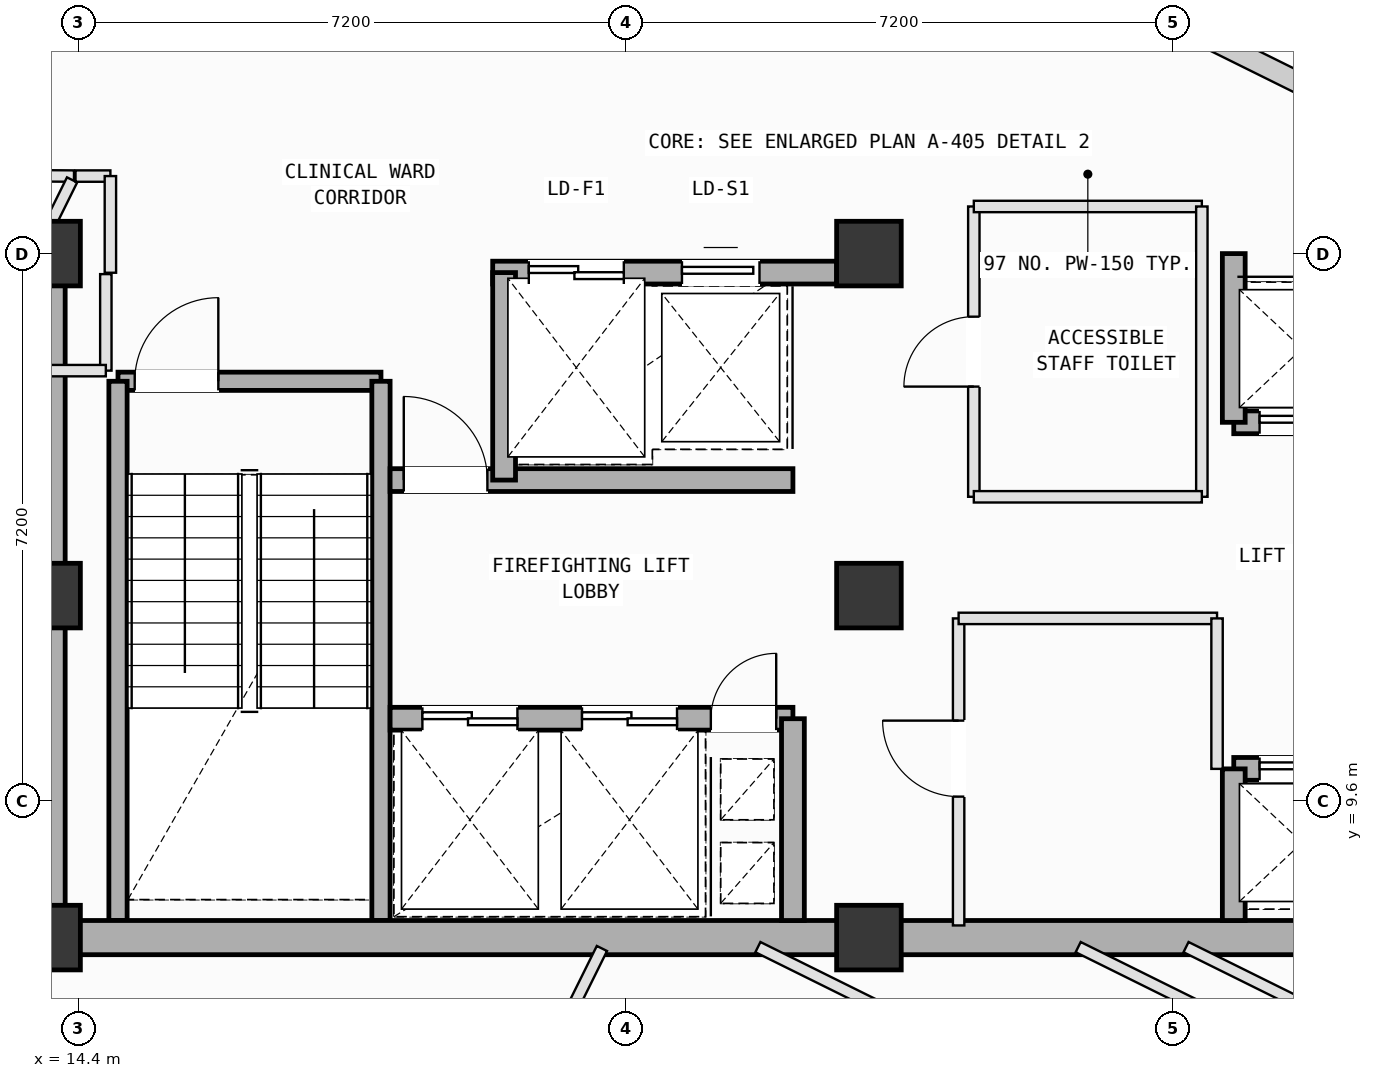
"""IFC4 building model, lengths in metres.
Left out: names, types, materials, properties, quantities, classifications, styles, units other than length and angle.
Written with IfcOpenShell. Run it as: python <this file> out.ifc"""

import sys

from ifc_helpers import new_model, si_unit, direction, frame, frame_2d, origin, origin_2d, place, context, subcontext, project, spatial, rectangle, extrude, element, fill, save


model = new_model("IFC4")
c1 = context("Model", 3, precision=1e-05, world=origin(), true_north=direction((0.0, 1.0)))
c2 = subcontext(c1, "Body", "Model", "MODEL_VIEW")
j1 = project(units=[si_unit("LENGTHUNIT", "METRE"), si_unit("PLANEANGLEUNIT", "RADIAN")], contexts=[c1])
p1 = place(None, origin())
s1 = spatial("IfcSite", under=j1, at=p1, CompositionType="ELEMENT")
p2 = place(p1, origin())
s2 = spatial("IfcBuilding", under=s1, at=p2, CompositionType="ELEMENT")
p3 = place(p2, frame((0.0, 0.0, 296.6)))
s3 = spatial("IfcBuildingStorey", under=s2, at=p3, CompositionType="ELEMENT", Elevation=296.6)
for number, where, z_axis, x_axis in (
    (1, (14.0, 7.8, 0.0), (0.0, 0.0, 1.0), (1.0, 0.0, 0.0)),
    (2, (14.0, 12.3, 0.0), (0.0, 0.0, 1.0), (1.0, 0.0, 0.0)),
    (3, (14.0, 16.8, 0.0), (0.0, 0.0, 1.0), (1.0, 0.0, 0.0)),
    (4, (24.8, 7.8, 0.0), (0.0, 0.0, 1.0), (1.0, 0.0, 0.0)),
    (5, (24.8, 12.3, 0.0), (0.0, 0.0, 1.0), (1.0, 0.0, 0.0)),
    (6, (24.8, 16.8, 0.0), (0.0, 0.0, 1.0), (1.0, 0.0, 0.0)),
):
    element("IfcColumn", number, at=place(p3, frame(where, z_axis=z_axis, x_axis=x_axis)), inside=s3, PredefinedType="COLUMN", context=c2, shape_type="SweptSolid", body=[
        extrude(rectangle(XDim=0.85, YDim=0.85, at=origin_2d()), origin(), (0.0, 0.0, 1.0), 4.0),
    ])
p4 = place(p3, frame((25.36, 21.572, 0.0), z_axis=(0.0, 0.0, 1.0), x_axis=(0.896098080612, -0.443856091458, 0.0)))
e7 = element("IfcWall", 7, at=p4, inside=s3, PredefinedType="SOLIDWALL", context=c2, shape_type="SweptSolid", body=[
    extrude(rectangle(XDim=6.958, YDim=0.28, at=frame_2d((3.479, 0.0))), origin(), (0.0, 0.0, 1.0), 3.165),
])
p5 = place(p3, frame((14.92, 15.12, 0.0), z_axis=(0.0, 0.0, 1.0), x_axis=(1.0, 0.0, 0.0)))
e8 = element("IfcWall", 8, at=p5, inside=s3, PredefinedType="SOLIDWALL", context=c2, shape_type="SweptSolid", body=[
    extrude(rectangle(XDim=3.46, YDim=0.24, at=frame_2d((1.73, 0.0))), origin(), (0.0, 0.0, 1.0), 3.78),
])
p6 = place(p5, frame((0.22, 0.0, 0.0)))
e9 = element("IfcOpeningElement", 9, at=p6, cuts=e8, PredefinedType="OPENING", context=c2, shape_type="SweptSolid", body=[
    extrude(rectangle(XDim=1.1, YDim=2.15, at=frame_2d((0.55, 1.075))), frame((0.0, 0.13, 0.0), z_axis=(0.0, -1.0, 0.0), x_axis=(1.0, 0.0, 0.0)), (0.0, 0.0, 1.0), 0.26),
])
for number, where, z_axis, x_axis in (
    (10, (18.38, 15.12, 0.0), (0.0, 0.0, 1.0), (0.0, -1.0, 0.0)),
    (11, (14.92, 8.025, 0.0), (0.0, 0.0, 1.0), (0.0, 1.0, 0.0)),
):
    element("IfcWall", number, at=place(p3, frame(where, z_axis=z_axis, x_axis=x_axis)), inside=s3, PredefinedType="SOLIDWALL", context=c2, shape_type="SweptSolid", body=[
        extrude(rectangle(XDim=7.095, YDim=0.24, at=frame_2d((3.548, 0.0))), origin(), (0.0, 0.0, 1.0), 3.78),
    ])
for number, where, z_axis, x_axis in (
    (12, (14.0, 7.8, 0.0), (0.0, 0.0, 1.0), (1.0, 0.0, 0.0)),
    (13, (24.8, 7.8, 0.0), (0.0, 0.0, 1.0), (1.0, 0.0, 0.0)),
):
    element("IfcWall", number, at=place(p3, frame(where, z_axis=z_axis, x_axis=x_axis)), inside=s3, PredefinedType="SHEAR", context=c2, shape_type="SweptSolid", body=[
        extrude(rectangle(XDim=10.8, YDim=0.45, at=frame_2d((5.4, 0.0))), origin(), (0.0, 0.0, 1.0), 3.78),
    ])
p7 = place(p3, frame((14.0, 16.8, 0.0), z_axis=(0.0, 0.0, 1.0), x_axis=(0.0, -1.0, 0.0)))
e14 = element("IfcWall", 14, at=p7, inside=s3, PredefinedType="SHEAR", context=c2, shape_type="SweptSolid", body=[
    extrude(rectangle(XDim=9.0, YDim=0.45, at=frame_2d((4.5, 0.0))), origin(), (0.0, 0.0, 1.0), 3.78),
])
p8 = place(p3, frame((19.85, 16.55, 0.0), z_axis=(0.0, 0.0, 1.0), x_axis=(1.0, 0.0, 0.0)))
e15 = element("IfcWall", 15, at=p8, inside=s3, PredefinedType="SOLIDWALL", context=c2, shape_type="SweptSolid", body=[
    extrude(rectangle(XDim=4.525, YDim=0.3, at=frame_2d((2.262, 0.0))), origin(), (0.0, 0.0, 1.0), 3.78),
])
p9 = place(p8, frame((0.475, 0.0, 0.0)))
e16 = element("IfcOpeningElement", 16, at=p9, cuts=e15, PredefinedType="OPENING", context=c2, shape_type="SweptSolid", body=[
    extrude(rectangle(XDim=1.25, YDim=2.18, at=frame_2d((0.625, 1.09))), frame((0.0, 0.16, 0.0), z_axis=(0.0, -1.0, 0.0), x_axis=(1.0, 0.0, 0.0)), (0.0, 0.0, 1.0), 0.32),
])
p10 = place(p8, frame((2.49, 0.0, 0.0)))
e17 = element("IfcOpeningElement", 17, at=p10, cuts=e15, PredefinedType="OPENING", context=c2, shape_type="SweptSolid", body=[
    extrude(rectangle(XDim=1.02, YDim=2.12, at=frame_2d((0.51, 1.06))), frame((0.0, 0.16, 0.0), z_axis=(0.0, -1.0, 0.0), x_axis=(1.0, 0.0, 0.0)), (0.0, 0.0, 1.0), 0.32),
])
p11 = place(p3, frame((18.5, 10.68, 0.0), z_axis=(0.0, 0.0, 1.0), x_axis=(1.0, 0.0, 0.0)))
e18 = element("IfcWall", 18, at=p11, inside=s3, PredefinedType="SOLIDWALL", context=c2, shape_type="SweptSolid", body=[
    extrude(rectangle(XDim=5.3, YDim=0.3, at=frame_2d((2.65, 0.0))), origin(), (0.0, 0.0, 1.0), 3.78),
])
p12 = place(p11, frame((4.22, 0.0, 0.0)))
e19 = element("IfcOpeningElement", 19, at=p12, cuts=e18, PredefinedType="OPENING", context=c2, shape_type="SweptSolid", body=[
    extrude(rectangle(XDim=0.86, YDim=2.06, at=frame_2d((0.43, 1.03))), frame((0.0, 0.16, 0.0), z_axis=(0.0, -1.0, 0.0), x_axis=(1.0, 0.0, 0.0)), (0.0, 0.0, 1.0), 0.32),
])
p13 = place(p11, frame((0.425, 0.0, 0.0)))
e20 = element("IfcOpeningElement", 20, at=p13, cuts=e18, PredefinedType="OPENING", context=c2, shape_type="SweptSolid", body=[
    extrude(rectangle(XDim=1.25, YDim=2.18, at=frame_2d((0.625, 1.09))), frame((0.0, 0.16, 0.0), z_axis=(0.0, -1.0, 0.0), x_axis=(1.0, 0.0, 0.0)), (0.0, 0.0, 1.0), 0.32),
])
p14 = place(p11, frame((2.525, 0.0, 0.0)))
e21 = element("IfcOpeningElement", 21, at=p14, cuts=e18, PredefinedType="OPENING", context=c2, shape_type="SweptSolid", body=[
    extrude(rectangle(XDim=1.25, YDim=2.18, at=frame_2d((0.625, 1.09))), frame((0.0, 0.16, 0.0), z_axis=(0.0, -1.0, 0.0), x_axis=(1.0, 0.0, 0.0)), (0.0, 0.0, 1.0), 0.32),
])
p15 = place(p3, frame((18.5, 13.82, 0.0), z_axis=(0.0, 0.0, 1.0), x_axis=(1.0, 0.0, 0.0)))
e22 = element("IfcWall", 22, at=p15, inside=s3, PredefinedType="SOLIDWALL", context=c2, shape_type="SweptSolid", body=[
    extrude(rectangle(XDim=5.3, YDim=0.3, at=frame_2d((2.65, 0.0))), origin(), (0.0, 0.0, 1.0), 3.78),
])
p16 = place(p15, frame((0.18, 0.0, 0.0)))
e23 = element("IfcOpeningElement", 23, at=p16, cuts=e22, PredefinedType="OPENING", context=c2, shape_type="SweptSolid", body=[
    extrude(rectangle(XDim=1.1, YDim=2.15, at=frame_2d((0.55, 1.075))), frame((0.0, 0.16, 0.0), z_axis=(0.0, -1.0, 0.0), x_axis=(1.0, 0.0, 0.0)), (0.0, 0.0, 1.0), 0.32),
])
p17 = place(p3, frame((23.8, 8.025, 0.0), z_axis=(0.0, 0.0, 1.0), x_axis=(0.0, 1.0, 0.0)))
e24 = element("IfcWall", 24, at=p17, inside=s3, PredefinedType="SOLIDWALL", context=c2, shape_type="SweptSolid", body=[
    extrude(rectangle(XDim=2.655, YDim=0.3, at=frame_2d((1.328, 0.0))), origin(), (0.0, 0.0, 1.0), 3.78),
])
p18 = place(p3, frame((20.0, 13.82, 0.0), z_axis=(0.0, 0.0, 1.0), x_axis=(0.0, 1.0, 0.0)))
e25 = element("IfcWall", 25, at=p18, inside=s3, PredefinedType="SOLIDWALL", context=c2, shape_type="SweptSolid", body=[
    extrude(rectangle(XDim=2.73, YDim=0.3, at=frame_2d((1.365, 0.0))), origin(), (0.0, 0.0, 1.0), 3.78),
])
p19 = place(p3, frame((29.6, 10.02, 0.0), z_axis=(0.0, 0.0, 1.0), x_axis=(1.0, 0.0, 0.0)))
e26 = element("IfcWall", 26, at=p19, inside=s3, PredefinedType="SOLIDWALL", context=c2, shape_type="SweptSolid", body=[
    extrude(rectangle(XDim=1.7, YDim=0.3, at=frame_2d((0.85, 0.0))), origin(), (0.0, 0.0, 1.0), 3.78),
])
p20 = place(p19, frame((0.34, 0.0, 0.0)))
e27 = element("IfcOpeningElement", 27, at=p20, cuts=e26, PredefinedType="OPENING", context=c2, shape_type="SweptSolid", body=[
    extrude(rectangle(XDim=1.12, YDim=2.15, at=frame_2d((0.56, 1.075))), frame((0.0, 0.16, 0.0), z_axis=(0.0, -1.0, 0.0), x_axis=(1.0, 0.0, 0.0)), (0.0, 0.0, 1.0), 0.32),
])
p21 = place(p3, frame((29.6, 8.025, 0.0), z_axis=(0.0, 0.0, 1.0), x_axis=(0.0, 1.0, 0.0)))
e28 = element("IfcWall", 28, at=p21, inside=s3, PredefinedType="SOLIDWALL", context=c2, shape_type="SweptSolid", body=[
    extrude(rectangle(XDim=1.995, YDim=0.3, at=frame_2d((0.998, 0.0))), origin(), (0.0, 0.0, 1.0), 3.78),
])
p22 = place(p3, frame((29.6, 14.58, 0.0), z_axis=(0.0, 0.0, 1.0), x_axis=(1.0, 0.0, 0.0)))
e29 = element("IfcWall", 29, at=p22, inside=s3, PredefinedType="SOLIDWALL", context=c2, shape_type="SweptSolid", body=[
    extrude(rectangle(XDim=1.7, YDim=0.3, at=frame_2d((0.85, 0.0))), origin(), (0.0, 0.0, 1.0), 3.78),
])
p23 = place(p22, frame((0.34, 0.0, 0.0)))
e30 = element("IfcOpeningElement", 30, at=p23, cuts=e29, PredefinedType="OPENING", context=c2, shape_type="SweptSolid", body=[
    extrude(rectangle(XDim=1.12, YDim=2.15, at=frame_2d((0.56, 1.075))), frame((0.0, 0.16, 0.0), z_axis=(0.0, -1.0, 0.0), x_axis=(1.0, 0.0, 0.0)), (0.0, 0.0, 1.0), 0.32),
])
p24 = place(p3, frame((29.6, 14.58, 0.0), z_axis=(0.0, 0.0, 1.0), x_axis=(0.0, 1.0, 0.0)))
e31 = element("IfcWall", 31, at=p24, inside=s3, PredefinedType="SOLIDWALL", context=c2, shape_type="SweptSolid", body=[
    extrude(rectangle(XDim=2.22, YDim=0.3, at=frame_2d((1.11, 0.0))), origin(), (0.0, 0.0, 1.0), 3.78),
])
p25 = place(p3, frame((25.98, 7.96, 0.0), z_axis=(0.0, 0.0, 1.0), x_axis=(0.0, 1.0, 0.0)))
e32 = element("IfcWall", 32, at=p25, inside=s3, PredefinedType="PARTITIONING", context=c2, shape_type="SweptSolid", body=[
    extrude(rectangle(XDim=4.04, YDim=0.15, at=frame_2d((2.02, 0.0))), origin(), (0.0, 0.0, 1.0), 3.78),
])
p26 = place(p25, frame((1.695, 0.0, 0.0)))
e33 = element("IfcOpeningElement", 33, at=p26, cuts=e32, PredefinedType="OPENING", context=c2, shape_type="SweptSolid", body=[
    extrude(rectangle(XDim=1.0, YDim=2.12, at=frame_2d((0.5, 1.06))), frame((0.0, 0.085, 0.0), z_axis=(0.0, -1.0, 0.0), x_axis=(1.0, 0.0, 0.0)), (0.0, 0.0, 1.0), 0.17),
])
p27 = place(p3, frame((25.98, 12.0, 0.0), z_axis=(0.0, 0.0, 1.0), x_axis=(1.0, 0.0, 0.0)))
e34 = element("IfcWall", 34, at=p27, inside=s3, PredefinedType="PARTITIONING", context=c2, shape_type="SweptSolid", body=[
    extrude(rectangle(XDim=3.4, YDim=0.15, at=frame_2d((1.7, 0.0))), origin(), (0.0, 0.0, 1.0), 3.78),
])
p28 = place(p3, frame((29.38, 12.0, 0.0), z_axis=(0.0, 0.0, 1.0), x_axis=(0.0, -1.0, 0.0)))
e35 = element("IfcWall", 35, at=p28, inside=s3, PredefinedType="PARTITIONING", context=c2, shape_type="SweptSolid", body=[
    extrude(rectangle(XDim=1.98, YDim=0.15, at=frame_2d((0.99, 0.0))), origin(), (0.0, 0.0, 1.0), 3.78),
])
p29 = place(p3, frame((26.18, 13.6, 0.0), z_axis=(0.0, 0.0, 1.0), x_axis=(0.0, 1.0, 0.0)))
e36 = element("IfcWall", 36, at=p29, inside=s3, PredefinedType="PARTITIONING", context=c2, shape_type="SweptSolid", body=[
    extrude(rectangle(XDim=3.82, YDim=0.15, at=frame_2d((1.91, 0.0))), origin(), (0.0, 0.0, 1.0), 3.78),
])
p30 = place(p29, frame((1.45, 0.0, 0.0)))
e37 = element("IfcOpeningElement", 37, at=p30, cuts=e36, PredefinedType="OPENING", context=c2, shape_type="SweptSolid", body=[
    extrude(rectangle(XDim=0.92, YDim=2.1, at=frame_2d((0.46, 1.05))), frame((0.0, 0.085, 0.0), z_axis=(0.0, -1.0, 0.0), x_axis=(1.0, 0.0, 0.0)), (0.0, 0.0, 1.0), 0.17),
])
p31 = place(p3, frame((26.18, 17.42, 0.0), z_axis=(0.0, 0.0, 1.0), x_axis=(1.0, 0.0, 0.0)))
e38 = element("IfcWall", 38, at=p31, inside=s3, PredefinedType="PARTITIONING", context=c2, shape_type="SweptSolid", body=[
    extrude(rectangle(XDim=3.0, YDim=0.15, at=frame_2d((1.5, 0.0))), origin(), (0.0, 0.0, 1.0), 3.78),
])
p32 = place(p3, frame((29.18, 17.42, 0.0), z_axis=(0.0, 0.0, 1.0), x_axis=(0.0, -1.0, 0.0)))
e39 = element("IfcWall", 39, at=p32, inside=s3, PredefinedType="PARTITIONING", context=c2, shape_type="SweptSolid", body=[
    extrude(rectangle(XDim=3.82, YDim=0.15, at=frame_2d((1.91, 0.0))), origin(), (0.0, 0.0, 1.0), 3.78),
])
p33 = place(p3, frame((29.18, 13.6, 0.0), z_axis=(0.0, 0.0, 1.0), x_axis=(-1.0, 0.0, 0.0)))
e40 = element("IfcWall", 40, at=p33, inside=s3, PredefinedType="PARTITIONING", context=c2, shape_type="SweptSolid", body=[
    extrude(rectangle(XDim=3.0, YDim=0.15, at=frame_2d((1.5, 0.0))), origin(), (0.0, 0.0, 1.0), 3.78),
])
p34 = place(p3, frame((18.398, 1.825, 0.0), z_axis=(0.0, 0.0, 1.0), x_axis=(0.443909549261, 0.89607159986, 0.0)))
e41 = element("IfcWall", 41, at=p34, inside=s3, PredefinedType="PARTITIONING", context=c2, shape_type="SweptSolid", body=[
    extrude(rectangle(XDim=6.509, YDim=0.15, at=frame_2d((3.254, 0.0))), origin(), (0.0, 0.0, 1.0), 3.78),
])
p35 = place(p34, frame((2.737, 0.0, 0.0)))
e42 = element("IfcOpeningElement", 42, at=p35, cuts=e41, PredefinedType="OPENING", context=c2, shape_type="SweptSolid", body=[
    extrude(rectangle(XDim=0.86, YDim=2.06, at=frame_2d((0.43, 1.03))), frame((0.0, 0.085, 0.0), z_axis=(0.0, -1.0, 0.0), x_axis=(1.0, 0.0, 0.0)), (0.0, 0.0, 1.0), 0.17),
])
p36 = place(p3, frame((23.339, 7.675, 0.0), z_axis=(0.0, 0.0, 1.0), x_axis=(0.896093187534, -0.443865969923, 0.0)))
e43 = element("IfcWall", 43, at=p36, inside=s3, PredefinedType="PARTITIONING", context=c2, shape_type="SweptSolid", body=[
    extrude(rectangle(XDim=4.409, YDim=0.15, at=frame_2d((2.205, 0.0))), origin(), (0.0, 0.0, 1.0), 3.78),
])
p37 = place(p3, frame((35.107, 4.636, 0.0), z_axis=(0.0, 0.0, 1.0), x_axis=(-0.8960827402, 0.443887060767, 0.0)))
e44 = element("IfcWall", 44, at=p37, inside=s3, PredefinedType="PARTITIONING", context=c2, shape_type="SweptSolid", body=[
    extrude(rectangle(XDim=6.846, YDim=0.15, at=frame_2d((3.423, 0.0))), origin(), (0.0, 0.0, 1.0), 3.78),
])
p38 = place(p3, frame((12.525, 17.833, 0.0), z_axis=(0.0, 0.0, 1.0), x_axis=(0.999974620907, -0.007124432707, 0.0)))
e45 = element("IfcWall", 45, at=p38, inside=s3, PredefinedType="PARTITIONING", context=c2, shape_type="SweptSolid", body=[
    extrude(rectangle(XDim=1.816, YDim=0.15, at=frame_2d((0.908, 0.0))), origin(), (0.0, 0.0, 1.0), 3.78),
])
p39 = place(p3, frame((14.316, 17.77, 0.0), z_axis=(0.0, 0.0, 1.0), x_axis=(-0.443525386391, -0.896261809756, 0.0)))
e46 = element("IfcWall", 46, at=p39, inside=s3, PredefinedType="PARTITIONING", context=c2, shape_type="SweptSolid", body=[
    extrude(rectangle(XDim=0.875, YDim=0.15, at=frame_2d((0.438, 0.0))), origin(), (0.0, 0.0, 1.0), 3.78),
])
p40 = place(p3, frame((27.553, 7.675, 0.0), z_axis=(0.0, 0.0, 1.0), x_axis=(0.896074338839, -0.443904020341, 0.0)))
e47 = element("IfcWall", 47, at=p40, inside=s3, PredefinedType="PARTITIONING", context=c2, shape_type="SweptSolid", body=[
    extrude(rectangle(XDim=6.409, YDim=0.15, at=frame_2d((3.205, 0.0))), origin(), (0.0, 0.0, 1.0), 3.78),
])
p41 = place(p3, frame((14.76, 16.53, 0.0), z_axis=(0.0, 0.0, 1.0), x_axis=(0.0, -1.0, 0.0)))
e48 = element("IfcWall", 48, at=p41, inside=s3, PredefinedType="PARTITIONING", context=c2, shape_type="SweptSolid", body=[
    extrude(rectangle(XDim=1.27, YDim=0.15, at=frame_2d((0.635, 0.0))), origin(), (0.0, 0.0, 1.0), 3.78),
])
p42 = place(p3, frame((14.76, 15.26, 0.0), z_axis=(0.0, 0.0, 1.0), x_axis=(-1.0, 0.0, 0.0)))
e49 = element("IfcWall", 49, at=p42, inside=s3, PredefinedType="PARTITIONING", context=c2, shape_type="SweptSolid", body=[
    extrude(rectangle(XDim=1.06, YDim=0.15, at=frame_2d((0.53, 0.0))), origin(), (0.0, 0.0, 1.0), 3.78),
])
p43 = place(p3, frame((14.361, 17.82, 0.0), z_axis=(0.0, 0.0, 1.0), x_axis=(1.0, 0.0, 0.0)))
e50 = element("IfcWall", 50, at=p43, inside=s3, PredefinedType="PARTITIONING", context=c2, shape_type="SweptSolid", body=[
    extrude(rectangle(XDim=0.459, YDim=0.15, at=frame_2d((0.229, 0.0))), origin(), (0.0, 0.0, 1.0), 3.78),
])
p44 = place(p3, frame((14.82, 17.82, 0.0), z_axis=(0.0, 0.0, 1.0), x_axis=(0.0, -1.0, 0.0)))
e51 = element("IfcWall", 51, at=p44, inside=s3, PredefinedType="PARTITIONING", context=c2, shape_type="SweptSolid", body=[
    extrude(rectangle(XDim=1.272, YDim=0.15, at=frame_2d((0.636, 0.0))), origin(), (0.0, 0.0, 1.0), 3.78),
])
p45 = place(p6, origin())
e52 = element("IfcDoor", 52, at=p45, inside=s3, OperationType="SINGLE_SWING_RIGHT", PredefinedType="DOOR", context=c2, shape_type="SweptSolid", body=[
    extrude(rectangle(XDim=1.1, YDim=2.15, at=frame_2d((0.55, 1.075))), frame((0.0, 0.025, 0.0), z_axis=(0.0, -1.0, 0.0), x_axis=(1.0, 0.0, 0.0)), (0.0, 0.0, 1.0), 0.05),
])
fill(e9, e52)
p46 = place(p12, origin())
e53 = element("IfcDoor", 53, at=p46, inside=s3, OperationType="SINGLE_SWING_RIGHT", PredefinedType="DOOR", context=c2, shape_type="SweptSolid", body=[
    extrude(rectangle(XDim=0.86, YDim=2.06, at=frame_2d((0.43, 1.03))), frame((0.0, 0.025, 0.0), z_axis=(0.0, -1.0, 0.0), x_axis=(1.0, 0.0, 0.0)), (0.0, 0.0, 1.0), 0.05),
])
fill(e19, e53)
p47 = place(p16, origin())
e54 = element("IfcDoor", 54, at=p47, inside=s3, OperationType="SINGLE_SWING_LEFT", PredefinedType="DOOR", context=c2, shape_type="SweptSolid", body=[
    extrude(rectangle(XDim=1.1, YDim=2.15, at=frame_2d((0.55, 1.075))), frame((0.0, 0.025, 0.0), z_axis=(0.0, -1.0, 0.0), x_axis=(1.0, 0.0, 0.0)), (0.0, 0.0, 1.0), 0.05),
])
fill(e23, e54)
p48 = place(p13, origin())
e55 = element("IfcDoor", 55, at=p48, inside=s3, OperationType="DOUBLE_DOOR_SLIDING", PredefinedType="DOOR", context=c2, shape_type="SweptSolid", body=[
    extrude(rectangle(XDim=1.25, YDim=2.18, at=frame_2d((0.625, 1.09))), frame((0.0, 0.025, 0.0), z_axis=(0.0, -1.0, 0.0), x_axis=(1.0, 0.0, 0.0)), (0.0, 0.0, 1.0), 0.05),
])
fill(e20, e55)
p49 = place(p14, origin())
e56 = element("IfcDoor", 56, at=p49, inside=s3, OperationType="DOUBLE_DOOR_SLIDING", PredefinedType="DOOR", context=c2, shape_type="SweptSolid", body=[
    extrude(rectangle(XDim=1.25, YDim=2.18, at=frame_2d((0.625, 1.09))), frame((0.0, 0.025, 0.0), z_axis=(0.0, -1.0, 0.0), x_axis=(1.0, 0.0, 0.0)), (0.0, 0.0, 1.0), 0.05),
])
fill(e21, e56)
p50 = place(p20, origin())
e57 = element("IfcDoor", 57, at=p50, inside=s3, OperationType="DOUBLE_DOOR_SLIDING", PredefinedType="DOOR", context=c2, shape_type="SweptSolid", body=[
    extrude(rectangle(XDim=1.12, YDim=2.15, at=frame_2d((0.56, 1.075))), frame((0.0, 0.025, 0.0), z_axis=(0.0, -1.0, 0.0), x_axis=(1.0, 0.0, 0.0)), (0.0, 0.0, 1.0), 0.05),
])
fill(e27, e57)
p51 = place(p23, origin())
e58 = element("IfcDoor", 58, at=p51, inside=s3, OperationType="DOUBLE_DOOR_SLIDING", PredefinedType="DOOR", context=c2, shape_type="SweptSolid", body=[
    extrude(rectangle(XDim=1.12, YDim=2.15, at=frame_2d((0.56, 1.075))), frame((0.0, 0.025, 0.0), z_axis=(0.0, -1.0, 0.0), x_axis=(1.0, 0.0, 0.0)), (0.0, 0.0, 1.0), 0.05),
])
fill(e30, e58)
p52 = place(p9, origin())
e59 = element("IfcDoor", 59, at=p52, inside=s3, OperationType="DOUBLE_DOOR_SLIDING", PredefinedType="DOOR", context=c2, shape_type="SweptSolid", body=[
    extrude(rectangle(XDim=1.25, YDim=2.18, at=frame_2d((0.625, 1.09))), frame((0.0, 0.025, 0.0), z_axis=(0.0, -1.0, 0.0), x_axis=(1.0, 0.0, 0.0)), (0.0, 0.0, 1.0), 0.05),
])
fill(e16, e59)
p53 = place(p10, origin())
e60 = element("IfcDoor", 60, at=p53, inside=s3, OperationType="SLIDING_TO_LEFT", PredefinedType="DOOR", context=c2, shape_type="SweptSolid", body=[
    extrude(rectangle(XDim=1.02, YDim=2.12, at=frame_2d((0.51, 1.06))), frame((0.0, 0.025, 0.0), z_axis=(0.0, -1.0, 0.0), x_axis=(1.0, 0.0, 0.0)), (0.0, 0.0, 1.0), 0.05),
])
fill(e17, e60)
p54 = place(p26, origin())
e61 = element("IfcDoor", 61, at=p54, inside=s3, OperationType="SINGLE_SWING_RIGHT", PredefinedType="DOOR", context=c2, shape_type="SweptSolid", body=[
    extrude(rectangle(XDim=1.0, YDim=2.12, at=frame_2d((0.5, 1.06))), frame((0.0, 0.025, 0.0), z_axis=(0.0, -1.0, 0.0), x_axis=(1.0, 0.0, 0.0)), (0.0, 0.0, 1.0), 0.05),
])
fill(e33, e61)
p55 = place(p30, origin())
e62 = element("IfcDoor", 62, at=p55, inside=s3, OperationType="SINGLE_SWING_LEFT", PredefinedType="DOOR", context=c2, shape_type="SweptSolid", body=[
    extrude(rectangle(XDim=0.92, YDim=2.1, at=frame_2d((0.46, 1.05))), frame((0.0, 0.025, 0.0), z_axis=(0.0, -1.0, 0.0), x_axis=(1.0, 0.0, 0.0)), (0.0, 0.0, 1.0), 0.05),
])
fill(e37, e62)
save(model, sys.argv[1])
